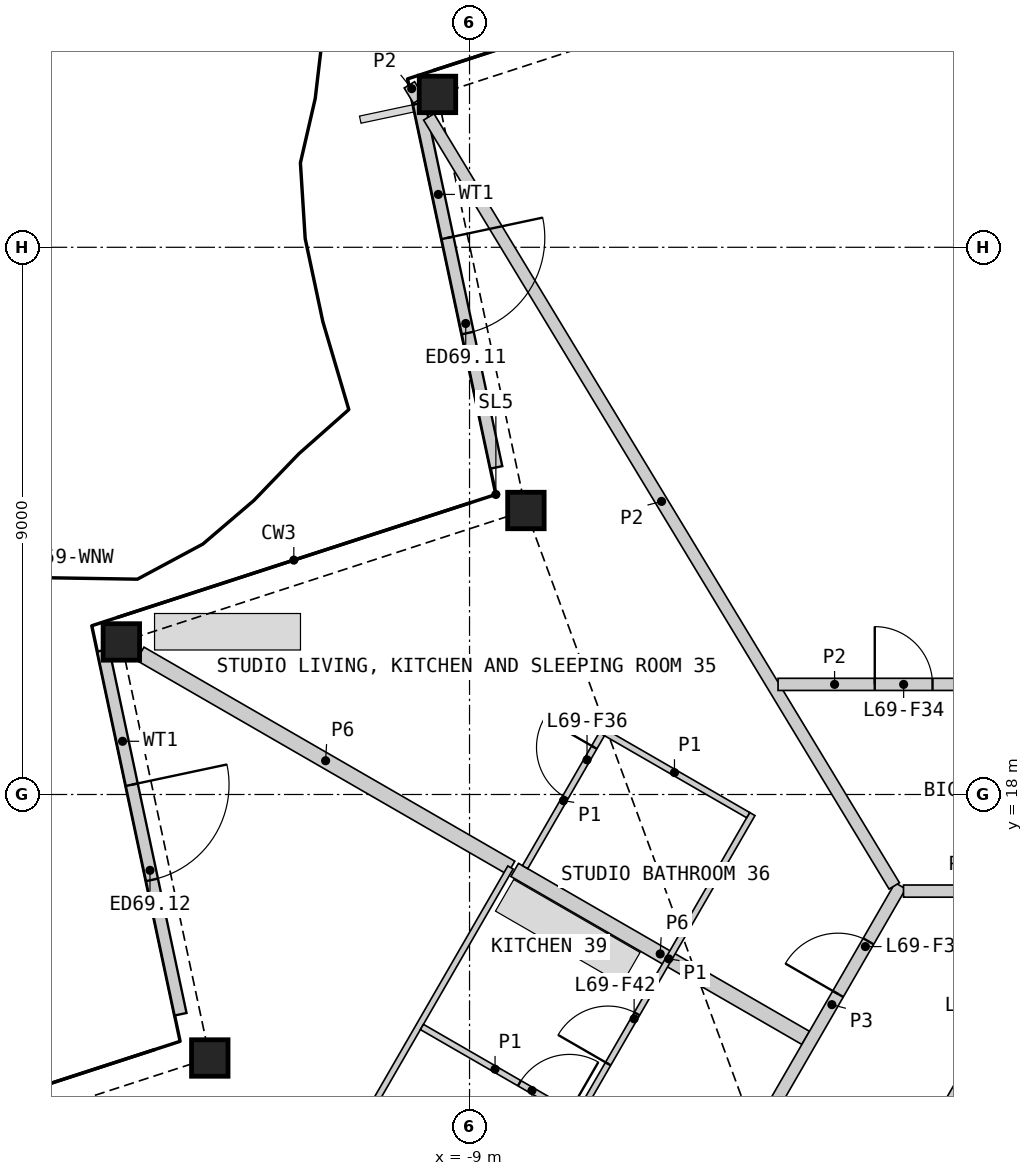
"""IFC4 building model, lengths in metres.
Left out: names, types, materials, properties, quantities, classifications, styles, units other than length and angle.
Written with IfcOpenShell. Run it as: python <this file> out.ifc"""

import sys

from ifc_helpers import new_model, si_unit, direction, frame, frame_2d, origin, origin_2d, place, context, subcontext, project, spatial, rectangle, hollow_rectangle, extrude, element, fill, save


model = new_model("IFC4")
c1 = context("Model", 3, precision=1e-05, world=origin(), true_north=direction((0.0, 1.0)))
c2 = subcontext(c1, "Body", "Model", "MODEL_VIEW")
j1 = project(units=[si_unit("LENGTHUNIT", "METRE"), si_unit("PLANEANGLEUNIT", "RADIAN")], contexts=[c1])
p1 = place(None, origin())
s1 = spatial("IfcSite", under=j1, at=p1, CompositionType="ELEMENT")
p2 = place(p1, origin())
s2 = spatial("IfcBuilding", under=s1, at=p2, CompositionType="ELEMENT")
p3 = place(p2, frame((0.0, 0.0, 315.4)))
s3 = spatial("IfcBuildingStorey", under=s2, at=p3, CompositionType="ELEMENT", Elevation=315.4)
for number, where, z_axis, x_axis in (
    (1, (-9.527, 29.514, 0.0), (0.0, 0.0, 1.0), (1.0, 0.0, 0.0)),
    (2, (-8.073, 22.671, 0.0), (0.0, 0.0, 1.0), (1.0, 0.0, 0.0)),
    (3, (-14.727, 20.509, 0.0), (0.0, 0.0, 1.0), (1.0, 0.0, 0.0)),
    (4, (-13.272, 13.666, 0.0), (0.0, 0.0, 1.0), (1.0, 0.0, 0.0)),
):
    element("IfcColumn", number, at=place(p3, frame(where, z_axis=z_axis, x_axis=x_axis)), inside=s3, PredefinedType="COLUMN", context=c2, shape_type="SweptSolid", body=[
        extrude(hollow_rectangle(XDim=0.6, YDim=0.6, WallThickness=0.04, at=origin_2d()), origin(), (0.0, 0.0, 1.0), 3.4),
    ])
p4 = place(p3, frame((-9.832, 29.366, 0.0), z_axis=(0.0, 0.0, 1.0), x_axis=(0.207932234858, -0.978143233738, 0.0)))
e5 = element("IfcWall", 5, at=p4, inside=s3, PredefinedType="SOLIDWALL", context=c2, shape_type="SweptSolid", body=[
    extrude(rectangle(XDim=6.12, YDim=0.2, at=frame_2d((3.06, 0.0))), origin(), (0.0, 0.0, 1.0), 2.488),
])
p5 = place(p4, frame((2.26, 0.0, 0.0)))
e6 = element("IfcOpeningElement", 6, at=p5, cuts=e5, PredefinedType="OPENING", context=c2, shape_type="SweptSolid", body=[
    extrude(rectangle(XDim=1.6, YDim=2.25, at=frame_2d((0.8, 1.125))), frame((0.0, 0.11, 0.0), z_axis=(0.0, -1.0, 0.0), x_axis=(1.0, 0.0, 0.0)), (0.0, 0.0, 1.0), 0.22),
])
p6 = place(p3, frame((-15.025, 20.372, 0.0), z_axis=(0.0, 0.0, 1.0), x_axis=(0.207932234858, -0.978143233738, 0.0)))
e7 = element("IfcWall", 7, at=p6, inside=s3, PredefinedType="SOLIDWALL", context=c2, shape_type="SweptSolid", body=[
    extrude(rectangle(XDim=6.12, YDim=0.2, at=frame_2d((3.06, 0.0))), origin(), (0.0, 0.0, 1.0), 2.488),
])
p7 = place(p6, frame((2.26, 0.0, 0.0)))
e8 = element("IfcOpeningElement", 8, at=p7, cuts=e7, PredefinedType="OPENING", context=c2, shape_type="SweptSolid", body=[
    extrude(rectangle(XDim=1.6, YDim=2.25, at=frame_2d((0.8, 1.125))), frame((0.0, 0.11, 0.0), z_axis=(0.0, -1.0, 0.0), x_axis=(1.0, 0.0, 0.0)), (0.0, 0.0, 1.0), 0.22),
])
p8 = place(p3, frame((-0.26, 13.961, 0.0), z_axis=(0.0, 0.0, 1.0), x_axis=(-0.49997936161, -0.866037319036, 0.0)))
e9 = element("IfcWall", 9, at=p8, inside=s3, PredefinedType="SHEAR", context=c2, shape_type="SweptSolid", body=[
    extrude(rectangle(XDim=2.66, YDim=0.6, at=frame_2d((1.33, 0.0))), origin(), (0.0, 0.0, 1.0), 3.1),
])
p9 = place(p8, frame((1.05, 0.0, 0.0)))
e10 = element("IfcOpeningElement", 10, at=p9, cuts=e9, PredefinedType="OPENING", context=c2, shape_type="SweptSolid", body=[
    extrude(rectangle(XDim=1.0, YDim=2.1, at=frame_2d((0.5, 1.05))), frame((0.0, 0.31, 0.0), z_axis=(0.0, -1.0, 0.0), x_axis=(1.0, 0.0, 0.0)), (0.0, 0.0, 1.0), 0.62),
])
p10 = place(p3, frame((-14.417, 20.316, 0.0), z_axis=(0.0, 0.0, 1.0), x_axis=(0.866022207469, -0.50000553614, 0.0)))
e11 = element("IfcWall", 11, at=p10, inside=s3, PredefinedType="PARTITIONING", context=c2, shape_type="SweptSolid", body=[
    extrude(rectangle(XDim=7.042, YDim=0.25, at=frame_2d((3.521, 0.0))), origin(), (0.0, 0.0, 1.0), 2.33),
])
p11 = place(p3, frame((-8.257, 16.76, 0.0), z_axis=(0.0, 0.0, 1.0), x_axis=(0.866034739526, -0.499983829672, 0.0)))
e12 = element("IfcWall", 12, at=p11, inside=s3, PredefinedType="PARTITIONING", context=c2, shape_type="SweptSolid", body=[
    extrude(rectangle(XDim=5.525, YDim=0.25, at=frame_2d((2.763, 0.0))), origin(), (0.0, 0.0, 1.0), 2.33),
])
p12 = place(p3, frame((-4.169, 12.59, 0.0), z_axis=(0.0, 0.0, 1.0), x_axis=(0.499950370306, 0.866054055606, 0.0)))
e13 = element("IfcWall", 13, at=p12, inside=s3, PredefinedType="PARTITIONING", context=c2, shape_type="SweptSolid", body=[
    extrude(rectangle(XDim=4.513, YDim=0.2, at=frame_2d((2.256, 0.0))), origin(), (0.0, 0.0, 1.0), 3.1),
])
p13 = place(p12, frame((2.459, 0.0, 0.0)))
e14 = element("IfcOpeningElement", 14, at=p13, cuts=e13, PredefinedType="OPENING", context=c2, shape_type="SweptSolid", body=[
    extrude(rectangle(XDim=1.0, YDim=2.1, at=frame_2d((0.5, 1.05))), frame((0.0, 0.11, 0.0), z_axis=(0.0, -1.0, 0.0), x_axis=(1.0, 0.0, 0.0)), (0.0, 0.0, 1.0), 0.22),
])
p14 = place(p3, frame((-1.863, 16.411, 0.0), z_axis=(0.0, 0.0, 1.0), x_axis=(1.0, 0.0, 0.0)))
e15 = element("IfcWall", 15, at=p14, inside=s3, PredefinedType="PARTITIONING", context=c2, shape_type="SweptSolid", body=[
    extrude(rectangle(XDim=3.726, YDim=0.2, at=frame_2d((1.863, 0.0))), origin(), (0.0, 0.0, 1.0), 3.1),
])
p15 = place(p14, frame((1.388, 0.0, 0.0)))
e16 = element("IfcOpeningElement", 16, at=p15, cuts=e15, PredefinedType="OPENING", context=c2, shape_type="SweptSolid", body=[
    extrude(rectangle(XDim=0.95, YDim=2.1, at=frame_2d((0.475, 1.05))), frame((0.0, 0.11, 0.0), z_axis=(0.0, -1.0, 0.0), x_axis=(1.0, 0.0, 0.0)), (0.0, 0.0, 1.0), 0.22),
])
p16 = place(p3, frame((-9.669, 29.144, 0.0), z_axis=(0.0, 0.0, 1.0), x_axis=(0.517770554559, -0.85551952218, 0.0)))
e17 = element("IfcWall", 17, at=p16, inside=s3, PredefinedType="PARTITIONING", context=c2, shape_type="SweptSolid", body=[
    extrude(rectangle(XDim=14.784, YDim=0.2, at=frame_2d((7.392, 0.0))), origin(), (0.0, 0.0, 1.0), 2.33),
])
p17 = place(p3, frame((-3.926, 19.811, 0.0), z_axis=(0.0, 0.0, 1.0), x_axis=(1.0, 0.0, 0.0)))
e18 = element("IfcWall", 18, at=p17, inside=s3, PredefinedType="PARTITIONING", context=c2, shape_type="SweptSolid", body=[
    extrude(rectangle(XDim=3.718, YDim=0.2, at=frame_2d((1.859, 0.0))), origin(), (0.0, 0.0, 1.0), 2.33),
])
p18 = place(p17, frame((1.59, 0.0, 0.0)))
e19 = element("IfcOpeningElement", 19, at=p18, cuts=e18, PredefinedType="OPENING", context=c2, shape_type="SweptSolid", body=[
    extrude(rectangle(XDim=0.95, YDim=2.1, at=frame_2d((0.475, 1.05))), frame((0.0, 0.11, 0.0), z_axis=(0.0, -1.0, 0.0), x_axis=(1.0, 0.0, 0.0)), (0.0, 0.0, 1.0), 0.22),
])
p19 = place(p3, frame((-9.989, 29.672, 0.0), z_axis=(0.0, 0.0, 1.0), x_axis=(0.517931387916, -0.855422163268, 0.0)))
e20 = element("IfcWall", 20, at=p19, inside=s3, PredefinedType="PARTITIONING", context=c2, shape_type="SweptSolid", body=[
    extrude(rectangle(XDim=0.292, YDim=0.2, at=frame_2d((0.146, 0.0))), origin(), (0.0, 0.0, 1.0), 2.33),
])
p20 = place(p3, frame((-13.544, 7.762, 0.0), z_axis=(0.0, 0.0, 1.0), x_axis=(0.499993819111, 0.866028972293, 0.0)))
e21 = element("IfcWall", 21, at=p20, inside=s3, PredefinedType="PARTITIONING", context=c2, shape_type="SweptSolid", body=[
    extrude(rectangle(XDim=10.436, YDim=0.1, at=frame_2d((5.218, 0.0))), origin(), (0.0, 0.0, 1.0), 2.33),
])
p21 = place(p20, frame((3.279, 0.0, 0.0)))
e22 = element("IfcOpeningElement", 22, at=p21, cuts=e21, PredefinedType="OPENING", context=c2, shape_type="SweptSolid", body=[
    extrude(rectangle(XDim=0.95, YDim=2.1, at=frame_2d((0.475, 1.05))), frame((0.0, 0.06, 0.0), z_axis=(0.0, -1.0, 0.0), x_axis=(1.0, 0.0, 0.0)), (0.0, 0.0, 1.0), 0.12),
])
p22 = place(p3, frame((-9.783, 14.177, 0.0), z_axis=(0.0, 0.0, 1.0), x_axis=(0.866030435321, -0.499991285022, 0.0)))
e23 = element("IfcWall", 23, at=p22, inside=s3, PredefinedType="PARTITIONING", context=c2, shape_type="SweptSolid", body=[
    extrude(rectangle(XDim=5.555, YDim=0.1, at=frame_2d((2.778, 0.0))), origin(), (0.0, 0.0, 1.0), 2.33),
])
p23 = place(p22, frame((1.852, 0.0, 0.0)))
e24 = element("IfcOpeningElement", 24, at=p23, cuts=e23, PredefinedType="OPENING", context=c2, shape_type="SweptSolid", body=[
    extrude(rectangle(XDim=0.95, YDim=2.1, at=frame_2d((0.475, 1.05))), frame((0.0, 0.06, 0.0), z_axis=(0.0, -1.0, 0.0), x_axis=(1.0, 0.0, 0.0)), (0.0, 0.0, 1.0), 0.12),
])
p24 = place(p3, frame((-7.099, 12.915, 0.0), z_axis=(0.0, 0.0, 1.0), x_axis=(0.49997732567, 0.866038494419, 0.0)))
e25 = element("IfcWall", 25, at=p24, inside=s3, PredefinedType="PARTITIONING", context=c2, shape_type="SweptSolid", body=[
    extrude(rectangle(XDim=5.5, YDim=0.1, at=frame_2d((2.75, 0.0))), origin(), (0.0, 0.0, 1.0), 2.33),
])
p25 = place(p24, frame((0.756, 0.0, 0.0)))
e26 = element("IfcOpeningElement", 26, at=p25, cuts=e25, PredefinedType="OPENING", context=c2, shape_type="SweptSolid", body=[
    extrude(rectangle(XDim=0.95, YDim=2.1, at=frame_2d((0.475, 1.05))), frame((0.0, 0.06, 0.0), z_axis=(0.0, -1.0, 0.0), x_axis=(1.0, 0.0, 0.0)), (0.0, 0.0, 1.0), 0.12),
])
p26 = place(p3, frame((-6.842, 19.06, 0.0), z_axis=(0.0, 0.0, 1.0), x_axis=(0.866034573852, -0.49998411664, 0.0)))
e27 = element("IfcWall", 27, at=p26, inside=s3, PredefinedType="PARTITIONING", context=c2, shape_type="SweptSolid", body=[
    extrude(rectangle(XDim=2.8, YDim=0.1, at=frame_2d((1.4, 0.0))), origin(), (0.0, 0.0, 1.0), 2.33),
])
p27 = place(p3, frame((-8.086, 16.805, 0.0), z_axis=(0.0, 0.0, 1.0), x_axis=(0.50001820224, 0.866014894461, 0.0)))
e28 = element("IfcWall", 28, at=p27, inside=s3, PredefinedType="PARTITIONING", context=c2, shape_type="SweptSolid", body=[
    extrude(rectangle(XDim=2.525, YDim=0.1, at=frame_2d((1.262, 0.0))), origin(), (0.0, 0.0, 1.0), 2.33),
])
p28 = place(p27, frame((1.325, 0.0, 0.0)))
e29 = element("IfcOpeningElement", 29, at=p28, cuts=e28, PredefinedType="OPENING", context=c2, shape_type="SweptSolid", body=[
    extrude(rectangle(XDim=0.95, YDim=2.1, at=frame_2d((0.475, 1.05))), frame((0.0, 0.06, 0.0), z_axis=(0.0, -1.0, 0.0), x_axis=(1.0, 0.0, 0.0)), (0.0, 0.0, 1.0), 0.12),
])
p29 = place(p5, origin())
e30 = element("IfcDoor", 30, at=p29, inside=s3, OperationType="DOUBLE_DOOR_SINGLE_SWING", PredefinedType="DOOR", context=c2, shape_type="SweptSolid", body=[
    extrude(rectangle(XDim=1.6, YDim=2.25, at=frame_2d((0.8, 1.125))), frame((0.0, 0.025, 0.0), z_axis=(0.0, -1.0, 0.0), x_axis=(1.0, 0.0, 0.0)), (0.0, 0.0, 1.0), 0.05),
])
fill(e6, e30)
p30 = place(p7, origin())
e31 = element("IfcDoor", 31, at=p30, inside=s3, OperationType="DOUBLE_DOOR_SINGLE_SWING", PredefinedType="DOOR", context=c2, shape_type="SweptSolid", body=[
    extrude(rectangle(XDim=1.6, YDim=2.25, at=frame_2d((0.8, 1.125))), frame((0.0, 0.025, 0.0), z_axis=(0.0, -1.0, 0.0), x_axis=(1.0, 0.0, 0.0)), (0.0, 0.0, 1.0), 0.05),
])
fill(e8, e31)
p31 = place(p18, origin())
e32 = element("IfcDoor", 32, at=p31, inside=s3, OperationType="SINGLE_SWING_LEFT", PredefinedType="DOOR", context=c2, shape_type="SweptSolid", body=[
    extrude(rectangle(XDim=0.95, YDim=2.1, at=frame_2d((0.475, 1.05))), frame((0.0, 0.025, 0.0), z_axis=(0.0, -1.0, 0.0), x_axis=(1.0, 0.0, 0.0)), (0.0, 0.0, 1.0), 0.05),
])
fill(e19, e32)
p32 = place(p13, origin())
e33 = element("IfcDoor", 33, at=p32, inside=s3, OperationType="SINGLE_SWING_LEFT", PredefinedType="DOOR", context=c2, shape_type="SweptSolid", body=[
    extrude(rectangle(XDim=1.0, YDim=2.1, at=frame_2d((0.5, 1.05))), frame((0.0, 0.025, 0.0), z_axis=(0.0, -1.0, 0.0), x_axis=(1.0, 0.0, 0.0)), (0.0, 0.0, 1.0), 0.05),
])
fill(e14, e33)
p33 = place(p28, origin())
e34 = element("IfcDoor", 34, at=p33, inside=s3, OperationType="SINGLE_SWING_RIGHT", PredefinedType="DOOR", context=c2, shape_type="SweptSolid", body=[
    extrude(rectangle(XDim=0.95, YDim=2.1, at=frame_2d((0.475, 1.05))), frame((0.0, 0.025, 0.0), z_axis=(0.0, -1.0, 0.0), x_axis=(1.0, 0.0, 0.0)), (0.0, 0.0, 1.0), 0.05),
])
fill(e29, e34)
p34 = place(p23, origin())
e35 = element("IfcDoor", 35, at=p34, inside=s3, OperationType="SINGLE_SWING_RIGHT", PredefinedType="DOOR", context=c2, shape_type="SweptSolid", body=[
    extrude(rectangle(XDim=0.95, YDim=2.1, at=frame_2d((0.475, 1.05))), frame((0.0, 0.025, 0.0), z_axis=(0.0, -1.0, 0.0), x_axis=(1.0, 0.0, 0.0)), (0.0, 0.0, 1.0), 0.05),
])
fill(e24, e35)
p35 = place(p25, origin())
e36 = element("IfcDoor", 36, at=p35, inside=s3, OperationType="SINGLE_SWING_LEFT", PredefinedType="DOOR", context=c2, shape_type="SweptSolid", body=[
    extrude(rectangle(XDim=0.95, YDim=2.1, at=frame_2d((0.475, 1.05))), frame((0.0, 0.025, 0.0), z_axis=(0.0, -1.0, 0.0), x_axis=(1.0, 0.0, 0.0)), (0.0, 0.0, 1.0), 0.05),
])
fill(e26, e36)
save(model, sys.argv[1])
